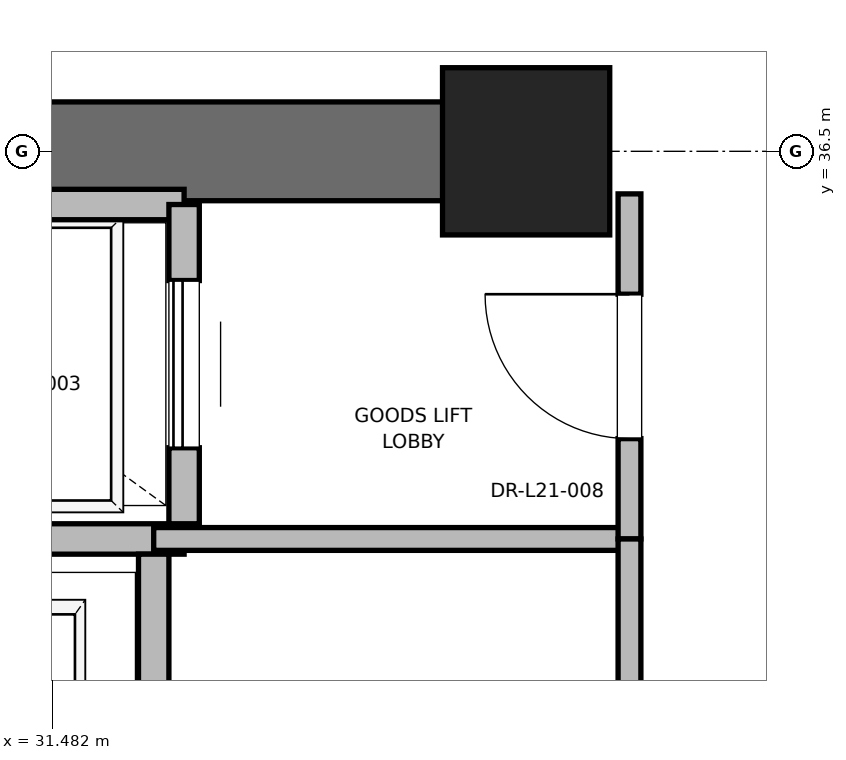
"""IFC4 building model, lengths in metres.
Left out: names, types, materials, properties, quantities, classifications, styles, units other than length and angle.
Written with IfcOpenShell. Run it as: python <this file> out.ifc"""

import sys

from ifc_helpers import new_model, si_unit, direction, frame, frame_2d, origin, origin_2d, place, context, subcontext, project, spatial, rectangle, extrude, element, fill, save


model = new_model("IFC4")
c1 = context("Model", 3, precision=1e-05, world=origin(), true_north=direction((0.0, 1.0)))
c2 = subcontext(c1, "Body", "Model", "MODEL_VIEW")
j1 = project(units=[si_unit("LENGTHUNIT", "METRE"), si_unit("PLANEANGLEUNIT", "RADIAN")], contexts=[c1])
p1 = place(None, origin())
s1 = spatial("IfcSite", under=j1, at=p1, CompositionType="ELEMENT")
p2 = place(p1, origin())
s2 = spatial("IfcBuilding", under=s1, at=p2, CompositionType="ELEMENT")
p3 = place(p2, frame((0.0, 0.0, 91.6)))
s3 = spatial("IfcBuildingStorey", under=s2, at=p3, CompositionType="ELEMENT", Elevation=91.6)
p4 = place(p3, frame((34.6, 36.5, 0.0), z_axis=(0.0, 0.0, 1.0), x_axis=(1.0, 0.0, 0.0)))
e1 = element("IfcColumn", 1, at=p4, inside=s3, PredefinedType="PILASTER", context=c2, shape_type="SweptSolid", body=[
    extrude(rectangle(XDim=1.1, YDim=1.1, at=origin_2d()), origin(), (0.0, 0.0, 1.0), 4.0),
])
p5 = place(p3, frame((29.0, 36.5, 0.0), z_axis=(0.0, 0.0, 1.0), x_axis=(1.0, 0.0, 0.0)))
e2 = element("IfcWall", 2, at=p5, inside=s3, PredefinedType="SHEAR", context=c2, shape_type="SweptSolid", body=[
    extrude(rectangle(XDim=5.8, YDim=0.65, at=frame_2d((2.9, 0.0))), origin(), (0.0, 0.0, 1.0), 3.76),
])
p6 = place(p3, frame((29.55, 33.95, 0.0), z_axis=(0.0, 0.0, 1.0), x_axis=(1.0, 0.0, 0.0)))
e3 = element("IfcWall", 3, at=p6, inside=s3, PredefinedType="SOLIDWALL", context=c2, shape_type="SweptSolid", body=[
    extrude(rectangle(XDim=2.8, YDim=0.2, at=frame_2d((1.4, 0.0))), origin(), (0.0, 0.0, 1.0), 3.76),
])
p7 = place(p3, frame((32.15, 30.85, 0.0), z_axis=(0.0, 0.0, 1.0), x_axis=(0.0, 1.0, 0.0)))
e4 = element("IfcWall", 4, at=p7, inside=s3, PredefinedType="SOLIDWALL", context=c2, shape_type="SweptSolid", body=[
    extrude(rectangle(XDim=3.0, YDim=0.2, at=frame_2d((1.5, 0.0))), origin(), (0.0, 0.0, 1.0), 3.76),
])
p8 = place(p3, frame((32.35, 36.15, 0.0), z_axis=(0.0, 0.0, 1.0), x_axis=(-1.0, 0.0, 0.0)))
e5 = element("IfcWall", 5, at=p8, inside=s3, PredefinedType="SOLIDWALL", context=c2, shape_type="SweptSolid", body=[
    extrude(rectangle(XDim=2.8, YDim=0.2, at=frame_2d((1.4, 0.0))), origin(), (0.0, 0.0, 1.0), 2.889),
])
p9 = place(p3, frame((32.35, 34.05, 0.0), z_axis=(0.0, 0.0, 1.0), x_axis=(0.0, 1.0, 0.0)))
e6 = element("IfcWall", 6, at=p9, inside=s3, PredefinedType="SOLIDWALL", context=c2, shape_type="SweptSolid", body=[
    extrude(rectangle(XDim=2.1, YDim=0.2, at=frame_2d((1.05, 0.0))), origin(), (0.0, 0.0, 1.0), 3.76),
])
p10 = place(p9, frame((0.5, 0.0, 0.0)))
e7 = element("IfcOpeningElement", 7, at=p10, cuts=e6, PredefinedType="OPENING", context=c2, shape_type="SweptSolid", body=[
    extrude(rectangle(XDim=1.1, YDim=2.2, at=frame_2d((0.55, 1.1))), frame((0.0, 0.1, 0.0), z_axis=(0.0, -1.0, 0.0), x_axis=(1.0, 0.0, 0.0)), (0.0, 0.0, 1.0), 0.2),
])
p11 = place(p3, frame((32.15, 33.95, 0.0), z_axis=(0.0, 0.0, 1.0), x_axis=(1.0, 0.0, 0.0)))
e8 = element("IfcWall", 8, at=p11, inside=s3, PredefinedType="PARTITIONING", context=c2, shape_type="SweptSolid", body=[
    extrude(rectangle(XDim=3.13, YDim=0.15, at=frame_2d((1.565, 0.0))), origin(), (0.0, 0.0, 1.0), 2.85),
])
p12 = place(p3, frame((35.28, 33.95, 0.0), z_axis=(0.0, 0.0, 1.0), x_axis=(0.0, 1.0, 0.0)))
e9 = element("IfcWall", 9, at=p12, inside=s3, PredefinedType="PARTITIONING", context=c2, shape_type="SweptSolid", body=[
    extrude(rectangle(XDim=2.27, YDim=0.15, at=frame_2d((1.135, 0.0))), origin(), (0.0, 0.0, 1.0), 2.54),
])
p13 = place(p12, frame((0.66, 0.0, 0.0)))
e10 = element("IfcOpeningElement", 10, at=p13, cuts=e9, PredefinedType="OPENING", context=c2, shape_type="SweptSolid", body=[
    extrude(rectangle(XDim=0.95, YDim=2.15, at=frame_2d((0.475, 1.075))), frame((0.0, 0.075, 0.0), z_axis=(0.0, -1.0, 0.0), x_axis=(1.0, 0.0, 0.0)), (0.0, 0.0, 1.0), 0.15),
])
p14 = place(p3, frame((35.28, 30.75, 0.0), z_axis=(0.0, 0.0, 1.0), x_axis=(0.0, 1.0, 0.0)))
e11 = element("IfcWall", 11, at=p14, inside=s3, PredefinedType="PARTITIONING", context=c2, shape_type="SweptSolid", body=[
    extrude(rectangle(XDim=3.2, YDim=0.15, at=frame_2d((1.6, 0.0))), origin(), (0.0, 0.0, 1.0), 2.85),
])
p15 = place(p14, frame((1.15, 0.0, 0.0)))
e12 = element("IfcOpeningElement", 12, at=p15, cuts=e11, PredefinedType="OPENING", context=c2, shape_type="SweptSolid", body=[
    extrude(rectangle(XDim=0.9, YDim=2.1, at=frame_2d((0.45, 1.05))), frame((0.0, 0.075, 0.0), z_axis=(0.0, -1.0, 0.0), x_axis=(1.0, 0.0, 0.0)), (0.0, 0.0, 1.0), 0.15),
])
p16 = place(p10, origin())
e13 = element("IfcDoor", 13, at=p16, inside=s3, OperationType="SLIDING_TO_RIGHT", PredefinedType="DOOR", context=c2, shape_type="SweptSolid", body=[
    extrude(rectangle(XDim=1.1, YDim=2.2, at=frame_2d((0.55, 1.1))), frame((0.0, 0.025, 0.0), z_axis=(0.0, -1.0, 0.0), x_axis=(1.0, 0.0, 0.0)), (0.0, 0.0, 1.0), 0.05),
])
fill(e7, e13)
p17 = place(p13, origin())
e14 = element("IfcDoor", 14, at=p17, inside=s3, OperationType="SINGLE_SWING_RIGHT", PredefinedType="DOOR", context=c2, shape_type="SweptSolid", body=[
    extrude(rectangle(XDim=0.95, YDim=2.15, at=frame_2d((0.475, 1.075))), frame((0.0, 0.025, 0.0), z_axis=(0.0, -1.0, 0.0), x_axis=(1.0, 0.0, 0.0)), (0.0, 0.0, 1.0), 0.05),
])
fill(e10, e14)
save(model, sys.argv[1])
